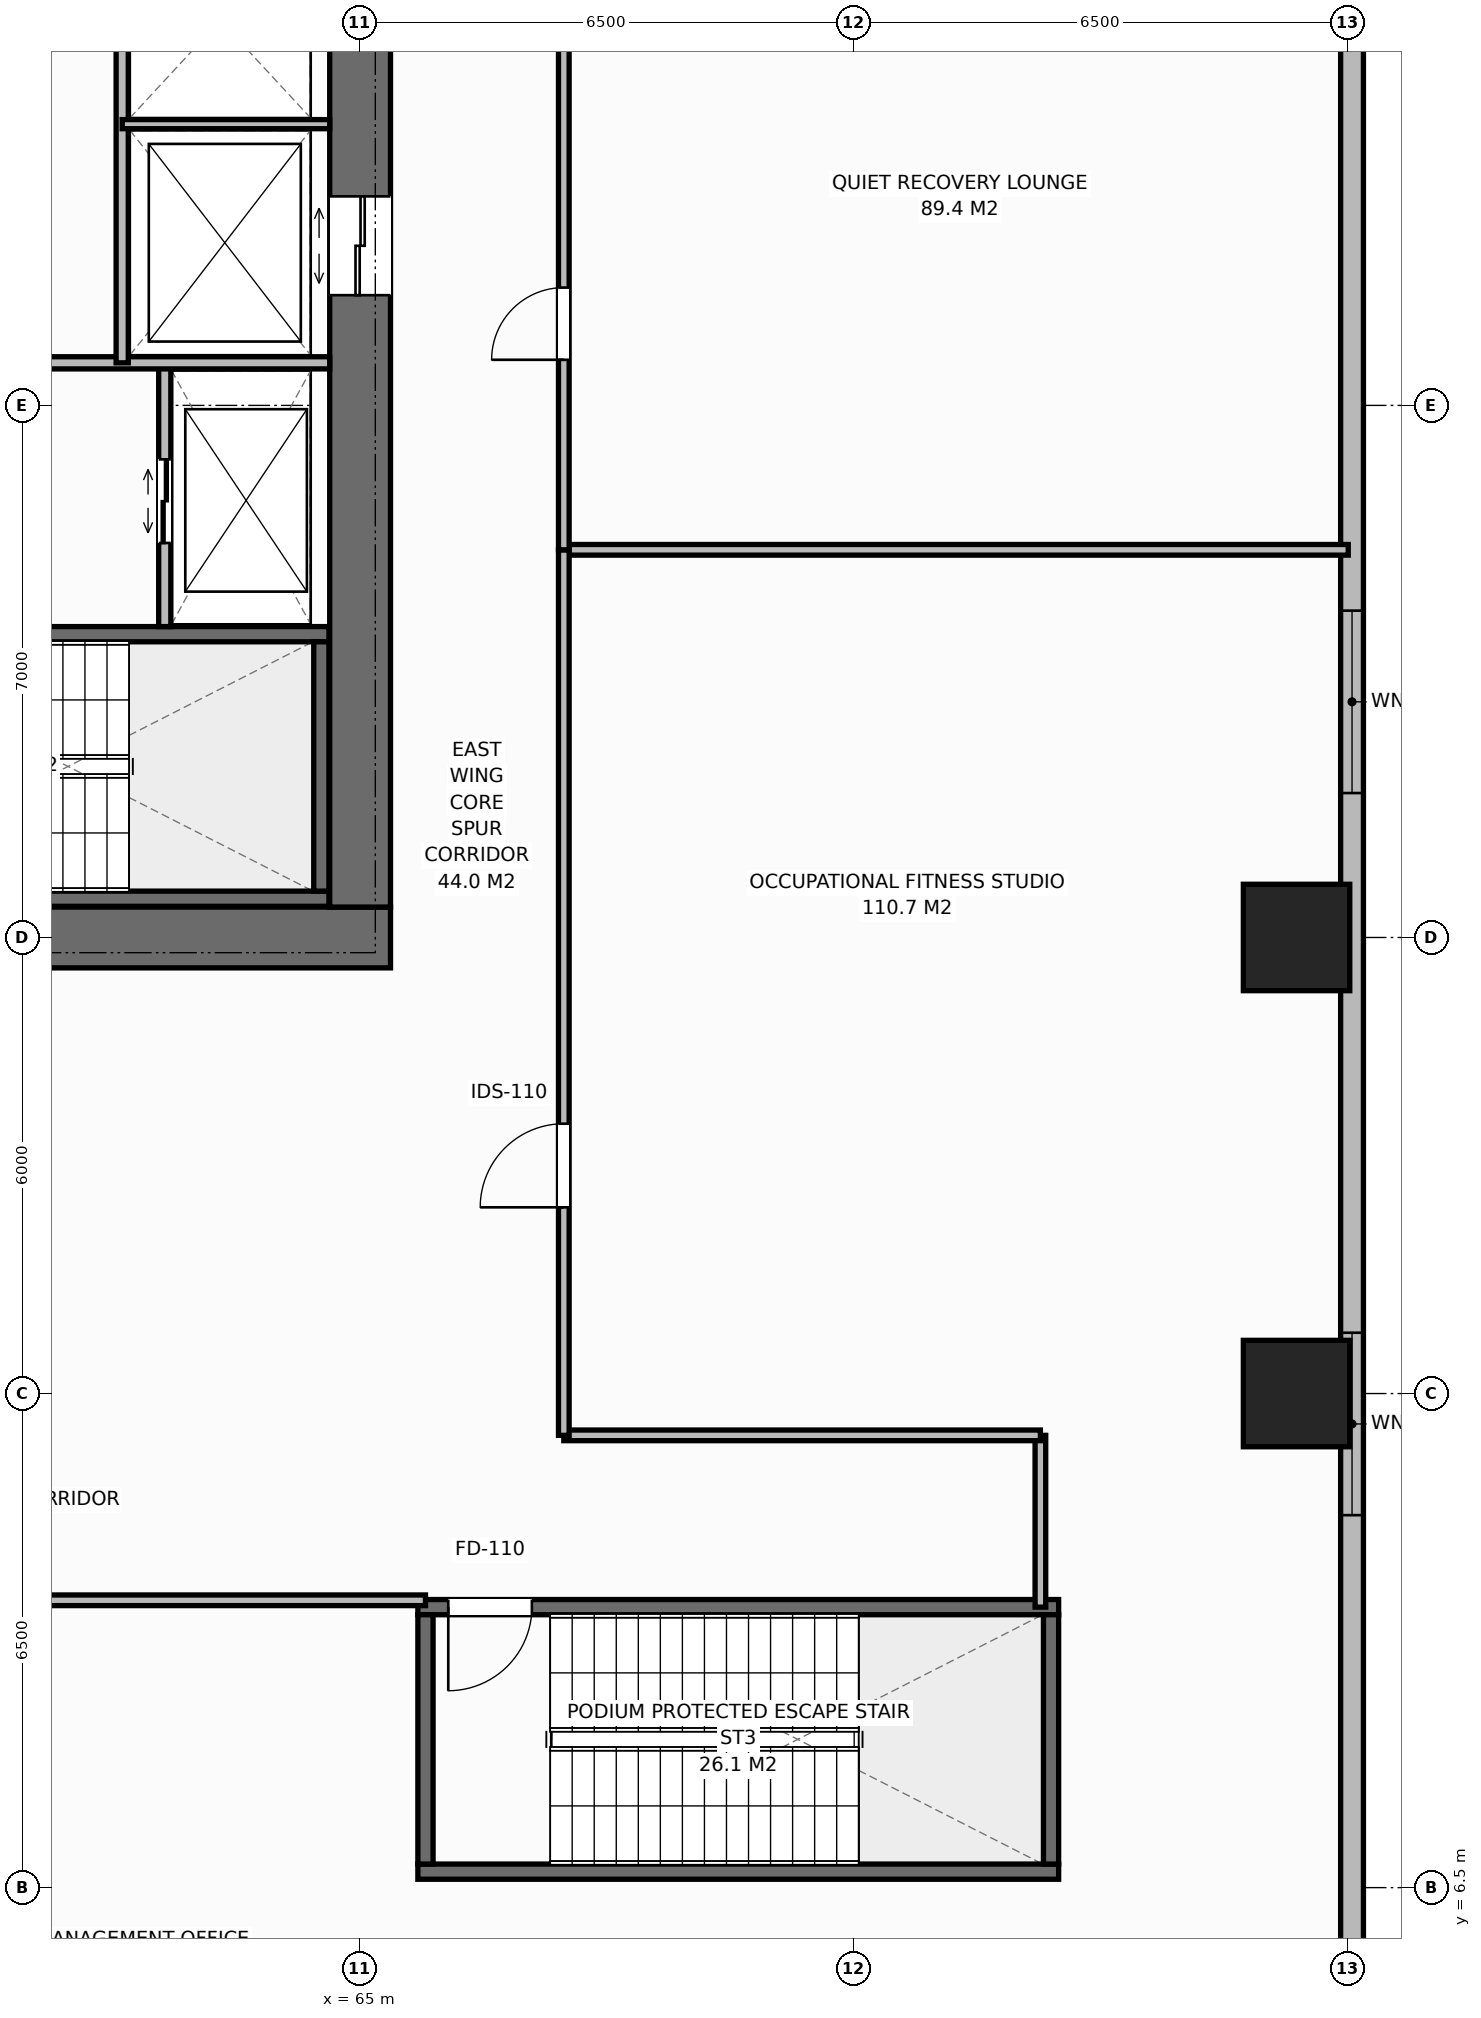
"""IFC4 building model, lengths in metres.
Left out: names, types, materials, properties, quantities, classifications, styles, units other than length and angle.
Written with IfcOpenShell. Run it as: python <this file> out.ifc"""

import sys

from ifc_helpers import new_model, si_unit, direction, frame, frame_2d, origin, origin_2d, place, context, subcontext, project, spatial, rectangle, extrude, element, fill, save


model = new_model("IFC4")
c1 = context("Model", 3, precision=1e-05, world=origin(), true_north=direction((0.0, 1.0)))
c2 = subcontext(c1, "Body", "Model", "MODEL_VIEW")
j1 = project(units=[si_unit("LENGTHUNIT", "METRE"), si_unit("PLANEANGLEUNIT", "RADIAN")], contexts=[c1])
p1 = place(None, origin())
s1 = spatial("IfcSite", under=j1, at=p1, CompositionType="ELEMENT")
p2 = place(p1, origin())
s2 = spatial("IfcBuilding", under=s1, at=p2, CompositionType="ELEMENT")
p3 = place(p2, frame((0.0, 0.0, 17.0)))
s3 = spatial("IfcBuildingStorey", under=s2, at=p3, CompositionType="ELEMENT", Elevation=17.0)
p4 = place(p3, frame((51.6, 19.0, 0.0), z_axis=(0.0, 0.0, 1.0), x_axis=(1.0, 0.0, 0.0)))
e1 = element("IfcWall", 1, at=p4, inside=s3, PredefinedType="SHEAR", context=c2, shape_type="SweptSolid", body=[
    extrude(rectangle(XDim=13.8, YDim=0.8, at=frame_2d((6.9, 0.0))), origin(), (0.0, 0.0, 1.0), 5.0),
])
p5 = place(p4, frame((3.12, 0.0, 0.0)))
e2 = element("IfcOpeningElement", 2, at=p5, cuts=e1, PredefinedType="OPENING", context=c2, shape_type="SweptSolid", body=[
    extrude(rectangle(XDim=1.4, YDim=2.2, at=frame_2d((0.7, 1.1))), frame((0.0, 0.41, 0.0), z_axis=(0.0, -1.0, 0.0), x_axis=(1.0, 0.0, 0.0)), (0.0, 0.0, 1.0), 0.82),
])
p6 = place(p3, frame((65.0, 19.4, 0.0), z_axis=(0.0, 0.0, 1.0), x_axis=(0.0, 1.0, 0.0)))
e3 = element("IfcWall", 3, at=p6, inside=s3, PredefinedType="SHEAR", context=c2, shape_type="SweptSolid", body=[
    extrude(rectangle(XDim=13.2, YDim=0.8, at=frame_2d((6.6, 0.0))), origin(), (0.0, 0.0, 1.0), 5.0),
])
p7 = place(p6, frame((8.05, 0.0, 0.0)))
e4 = element("IfcOpeningElement", 4, at=p7, cuts=e3, PredefinedType="OPENING", context=c2, shape_type="SweptSolid", body=[
    extrude(rectangle(XDim=1.3, YDim=2.2, at=frame_2d((0.65, 1.1))), frame((0.0, 0.41, 0.0), z_axis=(0.0, -1.0, 0.0), x_axis=(1.0, 0.0, 0.0)), (0.0, 0.0, 1.0), 0.82),
])
p8 = place(p3, frame((56.16, 19.51, 0.0), z_axis=(0.0, 0.0, 1.0), x_axis=(1.0, 0.0, 0.0)))
e5 = element("IfcWall", 5, at=p8, inside=s3, PredefinedType="SHEAR", context=c2, shape_type="SweptSolid", body=[
    extrude(rectangle(XDim=8.43, YDim=0.2, at=frame_2d((4.215, 0.0))), origin(), (0.0, 0.0, 1.0), 5.0),
])
p9 = place(p3, frame((56.16, 22.99, 0.0), z_axis=(0.0, 0.0, 1.0), x_axis=(1.0, 0.0, 0.0)))
e6 = element("IfcWall", 6, at=p9, inside=s3, PredefinedType="SHEAR", context=c2, shape_type="SweptSolid", body=[
    extrude(rectangle(XDim=8.43, YDim=0.2, at=frame_2d((4.215, 0.0))), origin(), (0.0, 0.0, 1.0), 5.0),
])
p10 = place(p9, frame((0.45, 0.0, 0.0)))
e7 = element("IfcOpeningElement", 7, at=p10, cuts=e6, PredefinedType="OPENING", context=c2, shape_type="SweptSolid", body=[
    extrude(rectangle(XDim=1.0, YDim=2.15, at=frame_2d((0.5, 1.075))), frame((0.0, 0.11, 0.0), z_axis=(0.0, -1.0, 0.0), x_axis=(1.0, 0.0, 0.0)), (0.0, 0.0, 1.0), 0.22),
])
p11 = place(p3, frame((64.49, 19.61, 0.0), z_axis=(0.0, 0.0, 1.0), x_axis=(0.0, 1.0, 0.0)))
e8 = element("IfcWall", 8, at=p11, inside=s3, PredefinedType="SHEAR", context=c2, shape_type="SweptSolid", body=[
    extrude(rectangle(XDim=3.28, YDim=0.2, at=frame_2d((1.64, 0.0))), origin(), (0.0, 0.0, 1.0), 5.0),
])
p12 = place(p3, frame((65.76, 6.71, 0.0), z_axis=(0.0, 0.0, 1.0), x_axis=(1.0, 0.0, 0.0)))
e9 = element("IfcWall", 9, at=p12, inside=s3, PredefinedType="SHEAR", context=c2, shape_type="SweptSolid", body=[
    extrude(rectangle(XDim=8.43, YDim=0.2, at=frame_2d((4.215, 0.0))), origin(), (0.0, 0.0, 1.0), 5.0),
])
p13 = place(p3, frame((65.76, 10.19, 0.0), z_axis=(0.0, 0.0, 1.0), x_axis=(1.0, 0.0, 0.0)))
e10 = element("IfcWall", 10, at=p13, inside=s3, PredefinedType="SHEAR", context=c2, shape_type="SweptSolid", body=[
    extrude(rectangle(XDim=8.43, YDim=0.2, at=frame_2d((4.215, 0.0))), origin(), (0.0, 0.0, 1.0), 5.0),
])
p14 = place(p13, frame((0.4, 0.0, 0.0)))
e11 = element("IfcOpeningElement", 11, at=p14, cuts=e10, PredefinedType="OPENING", context=c2, shape_type="SweptSolid", body=[
    extrude(rectangle(XDim=1.1, YDim=2.15, at=frame_2d((0.55, 1.075))), frame((0.0, 0.11, 0.0), z_axis=(0.0, -1.0, 0.0), x_axis=(1.0, 0.0, 0.0)), (0.0, 0.0, 1.0), 0.22),
])
for number, where, z_axis, x_axis in (
    (12, (65.86, 6.81, 0.0), (0.0, 0.0, 1.0), (0.0, 1.0, 0.0)),
    (13, (74.09, 6.81, 0.0), (0.0, 0.0, 1.0), (0.0, 1.0, 0.0)),
):
    element("IfcWall", number, at=place(p3, frame(where, z_axis=z_axis, x_axis=x_axis)), inside=s3, PredefinedType="SHEAR", context=c2, shape_type="SweptSolid", body=[
        extrude(rectangle(XDim=3.28, YDim=0.2, at=frame_2d((1.64, 0.0))), origin(), (0.0, 0.0, 1.0), 5.0),
    ])
for number, where, z_axis, x_axis in (
    (14, (77.32, 13.0, 0.0), (0.0, 0.0, 1.0), (1.0, 0.0, 0.0)),
    (15, (77.32, 19.0, 0.0), (0.0, 0.0, 1.0), (1.0, 0.0, 0.0)),
):
    element("IfcColumn", number, at=place(p3, frame(where, z_axis=z_axis, x_axis=x_axis)), inside=s3, PredefinedType="COLUMN", context=c2, shape_type="SweptSolid", body=[
        extrude(rectangle(XDim=1.4, YDim=1.4, at=origin_2d()), origin(), (0.0, 0.0, 1.0), 5.0),
    ])
p15 = place(p3, frame((78.05, 48.8, 0.0), z_axis=(0.0, 0.0, 1.0), x_axis=(0.0, -1.0, 0.0)))
e16 = element("IfcWall", 16, at=p15, inside=s3, PredefinedType="STANDARD", context=c2, shape_type="SweptSolid", body=[
    extrude(rectangle(XDim=45.6, YDim=0.3, at=frame_2d((22.8, 0.0))), origin(), (0.0, 0.0, 1.0), 4.4),
])
p16 = place(p15, frame((5.0, 0.0, 0.9)))
e17 = element("IfcOpeningElement", 17, at=p16, cuts=e16, PredefinedType="OPENING", context=c2, shape_type="SweptSolid", body=[
    extrude(rectangle(XDim=2.4, YDim=2.2, at=frame_2d((1.2, 1.1))), frame((0.0, 0.16, 0.0), z_axis=(0.0, -1.0, 0.0), x_axis=(1.0, 0.0, 0.0)), (0.0, 0.0, 1.0), 0.32),
])
p17 = place(p15, frame((14.5, 0.0, 0.9)))
e18 = element("IfcOpeningElement", 18, at=p17, cuts=e16, PredefinedType="OPENING", context=c2, shape_type="SweptSolid", body=[
    extrude(rectangle(XDim=2.4, YDim=2.2, at=frame_2d((1.2, 1.1))), frame((0.0, 0.16, 0.0), z_axis=(0.0, -1.0, 0.0), x_axis=(1.0, 0.0, 0.0)), (0.0, 0.0, 1.0), 0.32),
])
p18 = place(p15, frame((25.5, 0.0, 0.9)))
e19 = element("IfcOpeningElement", 19, at=p18, cuts=e16, PredefinedType="OPENING", context=c2, shape_type="SweptSolid", body=[
    extrude(rectangle(XDim=2.4, YDim=2.2, at=frame_2d((1.2, 1.1))), frame((0.0, 0.16, 0.0), z_axis=(0.0, -1.0, 0.0), x_axis=(1.0, 0.0, 0.0)), (0.0, 0.0, 1.0), 0.32),
])
p19 = place(p15, frame((35.0, 0.0, 0.9)))
e20 = element("IfcOpeningElement", 20, at=p19, cuts=e16, PredefinedType="OPENING", context=c2, shape_type="SweptSolid", body=[
    extrude(rectangle(XDim=2.4, YDim=2.2, at=frame_2d((1.2, 1.1))), frame((0.0, 0.16, 0.0), z_axis=(0.0, -1.0, 0.0), x_axis=(1.0, 0.0, 0.0)), (0.0, 0.0, 1.0), 0.32),
])
p20 = place(p3, frame((62.43, 23.09, 0.0), z_axis=(0.0, 0.0, 1.0), x_axis=(0.0, 1.0, 0.0)))
e21 = element("IfcWall", 21, at=p20, inside=s3, PredefinedType="STANDARD", context=c2, shape_type="SweptSolid", body=[
    extrude(rectangle(XDim=3.47, YDim=0.16, at=frame_2d((1.735, 0.0))), origin(), (0.0, 0.0, 1.0), 4.4),
])
p21 = place(p20, frame((1.1, 0.0, 0.0)))
e22 = element("IfcOpeningElement", 22, at=p21, cuts=e21, PredefinedType="OPENING", context=c2, shape_type="SweptSolid", body=[
    extrude(rectangle(XDim=1.1, YDim=2.2, at=frame_2d((0.55, 1.1))), frame((0.0, 0.09, 0.0), z_axis=(0.0, -1.0, 0.0), x_axis=(1.0, 0.0, 0.0)), (0.0, 0.0, 1.0), 0.18),
])
p22 = place(p3, frame((56.26, 26.56, 0.0), z_axis=(0.0, 0.0, 1.0), x_axis=(1.0, 0.0, 0.0)))
e23 = element("IfcWall", 23, at=p22, inside=s3, PredefinedType="STANDARD", context=c2, shape_type="SweptSolid", body=[
    extrude(rectangle(XDim=8.34, YDim=0.16, at=frame_2d((4.17, 0.0))), origin(), (0.0, 0.0, 1.0), 4.4),
])
p23 = place(p3, frame((61.87, 26.56, 0.0), z_axis=(0.0, 0.0, 1.0), x_axis=(0.0, 1.0, 0.0)))
e24 = element("IfcWall", 24, at=p23, inside=s3, PredefinedType="STANDARD", context=c2, shape_type="SweptSolid", body=[
    extrude(rectangle(XDim=6.04, YDim=0.16, at=frame_2d((3.02, 0.0))), origin(), (0.0, 0.0, 1.0), 4.4),
])
p24 = place(p3, frame((61.87, 29.7, 0.0), z_axis=(0.0, 0.0, 1.0), x_axis=(1.0, 0.0, 0.0)))
e25 = element("IfcWall", 25, at=p24, inside=s3, PredefinedType="PARTITIONING", context=c2, shape_type="SweptSolid", body=[
    extrude(rectangle(XDim=2.73, YDim=0.12, at=frame_2d((1.365, 0.0))), origin(), (0.0, 0.0, 1.0), 4.4),
])
p25 = place(p3, frame((67.68, 24.1, 0.0), z_axis=(0.0, 0.0, 1.0), x_axis=(1.0, 0.0, 0.0)))
e26 = element("IfcWall", 26, at=p25, inside=s3, PredefinedType="PARTITIONING", context=c2, shape_type="SweptSolid", body=[
    extrude(rectangle(XDim=10.32, YDim=0.14, at=frame_2d((5.16, 0.0))), origin(), (0.0, 0.0, 1.0), 4.4),
])
p26 = place(p3, frame((73.95, 10.19, 0.0), z_axis=(0.0, 0.0, 1.0), x_axis=(0.0, 1.0, 0.0)))
e27 = element("IfcWall", 27, at=p26, inside=s3, PredefinedType="PARTITIONING", context=c2, shape_type="SweptSolid", body=[
    extrude(rectangle(XDim=2.26, YDim=0.14, at=frame_2d((1.13, 0.0))), origin(), (0.0, 0.0, 1.0), 4.4),
])
p27 = place(p3, frame((67.68, 12.45, 0.0), z_axis=(0.0, 0.0, 1.0), x_axis=(1.0, 0.0, 0.0)))
e28 = element("IfcWall", 28, at=p27, inside=s3, PredefinedType="PARTITIONING", context=c2, shape_type="SweptSolid", body=[
    extrude(rectangle(XDim=6.27, YDim=0.14, at=frame_2d((3.135, 0.0))), origin(), (0.0, 0.0, 1.0), 4.4),
])
p28 = place(p3, frame((67.68, 12.45, 0.0), z_axis=(0.0, 0.0, 1.0), x_axis=(0.0, 1.0, 0.0)))
e29 = element("IfcWall", 29, at=p28, inside=s3, PredefinedType="PARTITIONING", context=c2, shape_type="SweptSolid", body=[
    extrude(rectangle(XDim=11.65, YDim=0.14, at=frame_2d((5.825, 0.0))), origin(), (0.0, 0.0, 1.0), 4.4),
])
p29 = place(p28, frame((3.0, 0.0, 0.0)))
e30 = element("IfcOpeningElement", 30, at=p29, cuts=e29, PredefinedType="OPENING", context=c2, shape_type="SweptSolid", body=[
    extrude(rectangle(XDim=1.1, YDim=2.15, at=frame_2d((0.55, 1.075))), frame((0.0, 0.08, 0.0), z_axis=(0.0, -1.0, 0.0), x_axis=(1.0, 0.0, 0.0)), (0.0, 0.0, 1.0), 0.16),
])
p30 = place(p3, frame((67.68, 24.1, 0.0), z_axis=(0.0, 0.0, 1.0), x_axis=(0.0, 1.0, 0.0)))
e31 = element("IfcWall", 31, at=p30, inside=s3, PredefinedType="PARTITIONING", context=c2, shape_type="SweptSolid", body=[
    extrude(rectangle(XDim=9.3, YDim=0.14, at=frame_2d((4.65, 0.0))), origin(), (0.0, 0.0, 1.0), 4.4),
])
p31 = place(p30, frame((2.5, 0.0, 0.0)))
e32 = element("IfcOpeningElement", 32, at=p31, cuts=e31, PredefinedType="OPENING", context=c2, shape_type="SweptSolid", body=[
    extrude(rectangle(XDim=0.95, YDim=2.15, at=frame_2d((0.475, 1.075))), frame((0.0, 0.08, 0.0), z_axis=(0.0, -1.0, 0.0), x_axis=(1.0, 0.0, 0.0)), (0.0, 0.0, 1.0), 0.16),
])
p32 = place(p3, frame((52.08, 10.28, 0.0), z_axis=(0.0, 0.0, 1.0), x_axis=(1.0, 0.0, 0.0)))
e33 = element("IfcWall", 33, at=p32, inside=s3, PredefinedType="PARTITIONING", context=c2, shape_type="SweptSolid", body=[
    extrude(rectangle(XDim=13.78, YDim=0.14, at=frame_2d((6.89, 0.0))), origin(), (0.0, 0.0, 1.0), 4.4),
])
p33 = place(p32, frame((2.5, 0.0, 0.0)))
e34 = element("IfcOpeningElement", 34, at=p33, cuts=e33, PredefinedType="OPENING", context=c2, shape_type="SweptSolid", body=[
    extrude(rectangle(XDim=0.95, YDim=2.15, at=frame_2d((0.475, 1.075))), frame((0.0, 0.08, 0.0), z_axis=(0.0, -1.0, 0.0), x_axis=(1.0, 0.0, 0.0)), (0.0, 0.0, 1.0), 0.16),
])
p34 = place(p18, origin())
e35 = element("IfcWindow", 35, at=p34, inside=s3, PartitioningType="SINGLE_PANEL", PredefinedType="WINDOW", context=c2, shape_type="SweptSolid", body=[
    extrude(rectangle(XDim=2.4, YDim=2.2, at=frame_2d((1.2, 1.1))), frame((0.0, 0.03, 0.0), z_axis=(0.0, -1.0, 0.0), x_axis=(1.0, 0.0, 0.0)), (0.0, 0.0, 1.0), 0.06),
])
fill(e19, e35)
p35 = place(p19, origin())
e36 = element("IfcWindow", 36, at=p35, inside=s3, PartitioningType="SINGLE_PANEL", PredefinedType="WINDOW", context=c2, shape_type="SweptSolid", body=[
    extrude(rectangle(XDim=2.4, YDim=2.2, at=frame_2d((1.2, 1.1))), frame((0.0, 0.03, 0.0), z_axis=(0.0, -1.0, 0.0), x_axis=(1.0, 0.0, 0.0)), (0.0, 0.0, 1.0), 0.06),
])
fill(e20, e36)
p36 = place(p21, origin())
e37 = element("IfcDoor", 37, at=p36, inside=s3, OperationType="DOUBLE_DOOR_SLIDING", PredefinedType="DOOR", context=c2, shape_type="SweptSolid", body=[
    extrude(rectangle(XDim=1.1, YDim=2.2, at=frame_2d((0.55, 1.1))), frame((0.0, 0.025, 0.0), z_axis=(0.0, -1.0, 0.0), x_axis=(1.0, 0.0, 0.0)), (0.0, 0.0, 1.0), 0.05),
])
fill(e22, e37)
p37 = place(p7, origin())
e38 = element("IfcDoor", 38, at=p37, inside=s3, OperationType="DOUBLE_DOOR_SLIDING", PredefinedType="DOOR", context=c2, shape_type="SweptSolid", body=[
    extrude(rectangle(XDim=1.3, YDim=2.2, at=frame_2d((0.65, 1.1))), frame((0.0, 0.025, 0.0), z_axis=(0.0, -1.0, 0.0), x_axis=(1.0, 0.0, 0.0)), (0.0, 0.0, 1.0), 0.05),
])
fill(e4, e38)
p38 = place(p14, origin())
e39 = element("IfcDoor", 39, at=p38, inside=s3, OperationType="SINGLE_SWING_RIGHT", PredefinedType="DOOR", context=c2, shape_type="SweptSolid", body=[
    extrude(rectangle(XDim=1.1, YDim=2.15, at=frame_2d((0.55, 1.075))), frame((0.0, 0.025, 0.0), z_axis=(0.0, -1.0, 0.0), x_axis=(1.0, 0.0, 0.0)), (0.0, 0.0, 1.0), 0.05),
])
fill(e11, e39)
p39 = place(p29, origin())
e40 = element("IfcDoor", 40, at=p39, inside=s3, OperationType="SINGLE_SWING_LEFT", PredefinedType="DOOR", context=c2, shape_type="SweptSolid", body=[
    extrude(rectangle(XDim=1.1, YDim=2.15, at=frame_2d((0.55, 1.075))), frame((0.0, 0.025, 0.0), z_axis=(0.0, -1.0, 0.0), x_axis=(1.0, 0.0, 0.0)), (0.0, 0.0, 1.0), 0.05),
])
fill(e30, e40)
p40 = place(p31, origin())
e41 = element("IfcDoor", 41, at=p40, inside=s3, OperationType="SINGLE_SWING_LEFT", PredefinedType="DOOR", context=c2, shape_type="SweptSolid", body=[
    extrude(rectangle(XDim=0.95, YDim=2.15, at=frame_2d((0.475, 1.075))), frame((0.0, 0.025, 0.0), z_axis=(0.0, -1.0, 0.0), x_axis=(1.0, 0.0, 0.0)), (0.0, 0.0, 1.0), 0.05),
])
fill(e32, e41)
save(model, sys.argv[1])
